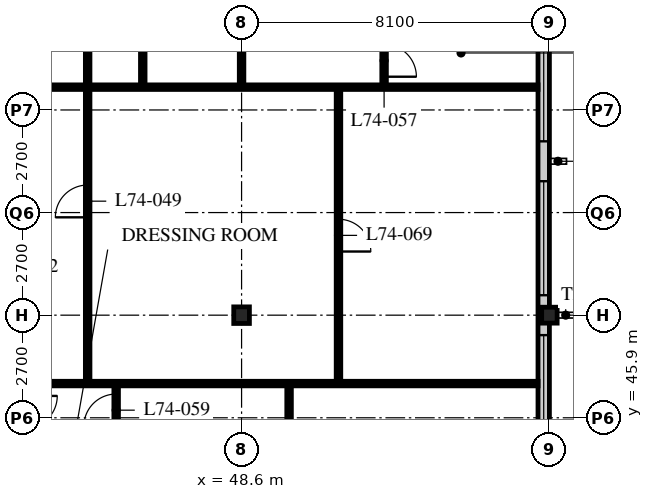
"""IFC4 building model, lengths in metres.
Left out: names, types, materials, properties, quantities, classifications, styles, units other than length and angle.
Written with IfcOpenShell. Run it as: python <this file> out.ifc"""

import sys

from ifc_helpers import new_model, si_unit, direction, frame, frame_2d, origin, origin_2d, place, context, subcontext, project, spatial, rectangle, i_section, extrude, element, fill, save


model = new_model("IFC4")
c1 = context("Model", 3, precision=1e-05, world=origin(), true_north=direction((0.0, 1.0)))
c2 = subcontext(c1, "Body", "Model", "MODEL_VIEW")
j1 = project(units=[si_unit("LENGTHUNIT", "METRE"), si_unit("PLANEANGLEUNIT", "RADIAN")], contexts=[c1])
p1 = place(None, origin())
s1 = spatial("IfcSite", under=j1, at=p1, CompositionType="ELEMENT")
p2 = place(p1, origin())
s2 = spatial("IfcBuilding", under=s1, at=p2, CompositionType="ELEMENT")
p3 = place(p2, frame((0.0, 0.0, 289.2)))
s3 = spatial("IfcBuildingStorey", under=s2, at=p3, CompositionType="ELEMENT", Elevation=289.2)
p4 = place(p3, frame((48.6, 48.6, 0.0), z_axis=(0.0, 0.0, 1.0), x_axis=(1.0, 0.0, 0.0)))
e1 = element("IfcColumn", 1, at=p4, inside=s3, PredefinedType="COLUMN", context=c2, shape_type="SweptSolid", body=[
    extrude(i_section(OverallWidth=0.412, OverallDepth=0.437, WebThickness=0.036, FlangeThickness=0.058, FilletRadius=0.015, at=origin_2d()), origin(), (0.0, 0.0, 1.0), 3.9),
])
p5 = place(p3, frame((56.7, 48.6, 0.0), z_axis=(0.0, 0.0, 1.0), x_axis=(1.0, 0.0, 0.0)))
e2 = element("IfcColumn", 2, at=p5, inside=s3, PredefinedType="COLUMN", context=c2, shape_type="SweptSolid", body=[
    extrude(i_section(OverallWidth=0.407, OverallDepth=0.419, WebThickness=0.031, FlangeThickness=0.049, FilletRadius=0.015, at=origin_2d()), origin(), (0.0, 0.0, 1.0), 3.9),
])
p6 = place(p3, frame((56.55, 24.6, 0.0), z_axis=(0.0, 0.0, 1.0), x_axis=(0.0, 1.0, 0.0)))
e3 = element("IfcWall", 3, at=p6, inside=s3, PredefinedType="SOLIDWALL", context=c2, shape_type="SweptSolid", body=[
    extrude(rectangle(XDim=32.1, YDim=0.3, at=frame_2d((16.05, 0.0))), origin(), (0.0, 0.0, 1.0), 3.69),
])
p7 = place(p6, frame((0.225, 0.0, 0.6)))
e4 = element("IfcOpeningElement", 4, at=p7, cuts=e3, PredefinedType="OPENING", context=c2, shape_type="SweptSolid", body=[
    extrude(rectangle(XDim=3.0, YDim=2.4, at=frame_2d((1.5, 1.2))), frame((0.0, 0.16, 0.0), z_axis=(0.0, -1.0, 0.0), x_axis=(1.0, 0.0, 0.0)), (0.0, 0.0, 1.0), 0.32),
])
p8 = place(p6, frame((4.275, 0.0, 0.6)))
e5 = element("IfcOpeningElement", 5, at=p8, cuts=e3, PredefinedType="OPENING", context=c2, shape_type="SweptSolid", body=[
    extrude(rectangle(XDim=3.0, YDim=2.4, at=frame_2d((1.5, 1.2))), frame((0.0, 0.16, 0.0), z_axis=(0.0, -1.0, 0.0), x_axis=(1.0, 0.0, 0.0)), (0.0, 0.0, 1.0), 0.32),
])
p9 = place(p6, frame((8.325, 0.0, 0.6)))
e6 = element("IfcOpeningElement", 6, at=p9, cuts=e3, PredefinedType="OPENING", context=c2, shape_type="SweptSolid", body=[
    extrude(rectangle(XDim=3.0, YDim=2.4, at=frame_2d((1.5, 1.2))), frame((0.0, 0.16, 0.0), z_axis=(0.0, -1.0, 0.0), x_axis=(1.0, 0.0, 0.0)), (0.0, 0.0, 1.0), 0.32),
])
p10 = place(p6, frame((12.375, 0.0, 0.6)))
e7 = element("IfcOpeningElement", 7, at=p10, cuts=e3, PredefinedType="OPENING", context=c2, shape_type="SweptSolid", body=[
    extrude(rectangle(XDim=3.0, YDim=2.4, at=frame_2d((1.5, 1.2))), frame((0.0, 0.16, 0.0), z_axis=(0.0, -1.0, 0.0), x_axis=(1.0, 0.0, 0.0)), (0.0, 0.0, 1.0), 0.32),
])
p11 = place(p6, frame((16.425, 0.0, 0.6)))
e8 = element("IfcOpeningElement", 8, at=p11, cuts=e3, PredefinedType="OPENING", context=c2, shape_type="SweptSolid", body=[
    extrude(rectangle(XDim=3.0, YDim=2.4, at=frame_2d((1.5, 1.2))), frame((0.0, 0.16, 0.0), z_axis=(0.0, -1.0, 0.0), x_axis=(1.0, 0.0, 0.0)), (0.0, 0.0, 1.0), 0.32),
])
p12 = place(p6, frame((20.475, 0.0, 0.6)))
e9 = element("IfcOpeningElement", 9, at=p12, cuts=e3, PredefinedType="OPENING", context=c2, shape_type="SweptSolid", body=[
    extrude(rectangle(XDim=3.0, YDim=2.4, at=frame_2d((1.5, 1.2))), frame((0.0, 0.16, 0.0), z_axis=(0.0, -1.0, 0.0), x_axis=(1.0, 0.0, 0.0)), (0.0, 0.0, 1.0), 0.32),
])
p13 = place(p6, frame((24.525, 0.0, 0.6)))
e10 = element("IfcOpeningElement", 10, at=p13, cuts=e3, PredefinedType="OPENING", context=c2, shape_type="SweptSolid", body=[
    extrude(rectangle(XDim=3.0, YDim=2.4, at=frame_2d((1.5, 1.2))), frame((0.0, 0.16, 0.0), z_axis=(0.0, -1.0, 0.0), x_axis=(1.0, 0.0, 0.0)), (0.0, 0.0, 1.0), 0.32),
])
p14 = place(p6, frame((28.575, 0.0, 0.6)))
e11 = element("IfcOpeningElement", 11, at=p14, cuts=e3, PredefinedType="OPENING", context=c2, shape_type="SweptSolid", body=[
    extrude(rectangle(XDim=3.0, YDim=2.4, at=frame_2d((1.5, 1.2))), frame((0.0, 0.16, 0.0), z_axis=(0.0, -1.0, 0.0), x_axis=(1.0, 0.0, 0.0)), (0.0, 0.0, 1.0), 0.32),
])
p15 = place(p3, frame((42.9, 46.8, 0.0), z_axis=(0.0, 0.0, 1.0), x_axis=(1.0, 0.0, 0.0)))
e12 = element("IfcWall", 12, at=p15, inside=s3, PredefinedType="PARTITIONING", context=c2, shape_type="SweptSolid", body=[
    extrude(rectangle(XDim=13.5, YDim=0.12, at=frame_2d((6.75, 0.0))), origin(), (0.0, 0.0, 1.0), 3.69),
])
p16 = place(p3, frame((36.45, 54.6, 0.0), z_axis=(0.0, 0.0, 1.0), x_axis=(1.0, 0.0, 0.0)))
e13 = element("IfcWall", 13, at=p16, inside=s3, PredefinedType="PARTITIONING", context=c2, shape_type="SweptSolid", body=[
    extrude(rectangle(XDim=19.95, YDim=0.12, at=frame_2d((9.975, 0.0))), origin(), (0.0, 0.0, 1.0), 3.69),
])
p17 = place(p16, frame((1.675, 0.0, 0.0)))
e14 = element("IfcOpeningElement", 14, at=p17, cuts=e13, PredefinedType="OPENING", context=c2, shape_type="SweptSolid", body=[
    extrude(rectangle(XDim=0.85, YDim=2.1, at=frame_2d((0.425, 1.05))), frame((0.0, 0.07, 0.0), z_axis=(0.0, -1.0, 0.0), x_axis=(1.0, 0.0, 0.0)), (0.0, 0.0, 1.0), 0.14),
])
p18 = place(p3, frame((44.55, 64.5, 0.0), z_axis=(0.0, 0.0, 1.0), x_axis=(0.0, -1.0, 0.0)))
e15 = element("IfcWall", 15, at=p18, inside=s3, PredefinedType="PARTITIONING", context=c2, shape_type="SweptSolid", body=[
    extrude(rectangle(XDim=17.7, YDim=0.12, at=frame_2d((8.85, 0.0))), origin(), (0.0, 0.0, 1.0), 3.69),
])
p19 = place(p18, frame((12.475, 0.0, 0.0)))
e16 = element("IfcOpeningElement", 16, at=p19, cuts=e15, PredefinedType="OPENING", context=c2, shape_type="SweptSolid", body=[
    extrude(rectangle(XDim=0.85, YDim=2.1, at=frame_2d((0.425, 1.05))), frame((0.0, 0.07, 0.0), z_axis=(0.0, -1.0, 0.0), x_axis=(1.0, 0.0, 0.0)), (0.0, 0.0, 1.0), 0.14),
])
p20 = place(p18, frame((4.525, 0.0, 0.0)))
e17 = element("IfcOpeningElement", 17, at=p20, cuts=e15, PredefinedType="OPENING", context=c2, shape_type="SweptSolid", body=[
    extrude(rectangle(XDim=0.85, YDim=2.1, at=frame_2d((0.425, 1.05))), frame((0.0, 0.07, 0.0), z_axis=(0.0, -1.0, 0.0), x_axis=(1.0, 0.0, 0.0)), (0.0, 0.0, 1.0), 0.14),
])
p21 = place(p3, frame((52.35, 54.6, 0.0), z_axis=(0.0, 0.0, 1.0), x_axis=(0.0, 1.0, 0.0)))
e18 = element("IfcWall", 18, at=p21, inside=s3, PredefinedType="PARTITIONING", context=c2, shape_type="SweptSolid", body=[
    extrude(rectangle(XDim=1.8, YDim=0.12, at=frame_2d((0.9, 0.0))), origin(), (0.0, 0.0, 1.0), 3.69),
])
p22 = place(p21, frame((0.275, 0.0, 0.0)))
e19 = element("IfcOpeningElement", 19, at=p22, cuts=e18, PredefinedType="OPENING", context=c2, shape_type="SweptSolid", body=[
    extrude(rectangle(XDim=0.85, YDim=2.1, at=frame_2d((0.425, 1.05))), frame((0.0, 0.07, 0.0), z_axis=(0.0, -1.0, 0.0), x_axis=(1.0, 0.0, 0.0)), (0.0, 0.0, 1.0), 0.14),
])
p23 = place(p3, frame((45.3, 46.8, 0.0), z_axis=(0.0, 0.0, 1.0), x_axis=(0.0, -1.0, 0.0)))
e20 = element("IfcWall", 20, at=p23, inside=s3, PredefinedType="PARTITIONING", context=c2, shape_type="SweptSolid", body=[
    extrude(rectangle(XDim=4.01, YDim=0.12, at=frame_2d((2.005, 0.0))), origin(), (0.0, 0.0, 1.0), 3.69),
])
p24 = place(p23, frame((0.275, 0.0, 0.0)))
e21 = element("IfcOpeningElement", 21, at=p24, cuts=e20, PredefinedType="OPENING", context=c2, shape_type="SweptSolid", body=[
    extrude(rectangle(XDim=0.85, YDim=2.1, at=frame_2d((0.425, 1.05))), frame((0.0, 0.07, 0.0), z_axis=(0.0, -1.0, 0.0), x_axis=(1.0, 0.0, 0.0)), (0.0, 0.0, 1.0), 0.14),
])
p25 = place(p3, frame((51.15, 46.8, 0.0), z_axis=(0.0, 0.0, 1.0), x_axis=(0.0, 1.0, 0.0)))
e22 = element("IfcWall", 22, at=p25, inside=s3, PredefinedType="PARTITIONING", context=c2, shape_type="SweptSolid", body=[
    extrude(rectangle(XDim=7.8, YDim=0.12, at=frame_2d((3.9, 0.0))), origin(), (0.0, 0.0, 1.0), 3.69),
])
p26 = place(p25, frame((3.475, 0.0, 0.0)))
e23 = element("IfcOpeningElement", 23, at=p26, cuts=e22, PredefinedType="OPENING", context=c2, shape_type="SweptSolid", body=[
    extrude(rectangle(XDim=0.85, YDim=2.1, at=frame_2d((0.425, 1.05))), frame((0.0, 0.07, 0.0), z_axis=(0.0, -1.0, 0.0), x_axis=(1.0, 0.0, 0.0)), (0.0, 0.0, 1.0), 0.14),
])
p27 = place(p3, frame((46.0, 54.6, 0.0), z_axis=(0.0, 0.0, 1.0), x_axis=(0.0, 1.0, 0.0)))
e24 = element("IfcWall", 24, at=p27, inside=s3, PredefinedType="PARTITIONING", context=c2, shape_type="SweptSolid", body=[
    extrude(rectangle(XDim=5.85, YDim=0.12, at=frame_2d((2.925, 0.0))), origin(), (0.0, 0.0, 1.0), 3.69),
])
p28 = place(p27, frame((2.5, 0.0, 0.0)))
e25 = element("IfcOpeningElement", 25, at=p28, cuts=e24, PredefinedType="OPENING", context=c2, shape_type="SweptSolid", body=[
    extrude(rectangle(XDim=0.85, YDim=2.1, at=frame_2d((0.425, 1.05))), frame((0.0, 0.07, 0.0), z_axis=(0.0, -1.0, 0.0), x_axis=(1.0, 0.0, 0.0)), (0.0, 0.0, 1.0), 0.14),
])
p29 = place(p3, frame((49.85, 40.5, 0.0), z_axis=(0.0, 0.0, 1.0), x_axis=(0.0, 1.0, 0.0)))
e26 = element("IfcWall", 26, at=p29, inside=s3, PredefinedType="PARTITIONING", context=c2, shape_type="SweptSolid", body=[
    extrude(rectangle(XDim=6.3, YDim=0.12, at=frame_2d((3.15, 0.0))), origin(), (0.0, 0.0, 1.0), 3.69),
])
p30 = place(p29, frame((2.725, 0.0, 0.0)))
e27 = element("IfcOpeningElement", 27, at=p30, cuts=e26, PredefinedType="OPENING", context=c2, shape_type="SweptSolid", body=[
    extrude(rectangle(XDim=0.85, YDim=2.1, at=frame_2d((0.425, 1.05))), frame((0.0, 0.07, 0.0), z_axis=(0.0, -1.0, 0.0), x_axis=(1.0, 0.0, 0.0)), (0.0, 0.0, 1.0), 0.14),
])
p31 = place(p3, frame((48.6, 54.6, 0.0), z_axis=(0.0, 0.0, 1.0), x_axis=(0.0, 1.0, 0.0)))
e28 = element("IfcWall", 28, at=p31, inside=s3, PredefinedType="PARTITIONING", context=c2, shape_type="SweptSolid", body=[
    extrude(rectangle(XDim=1.897, YDim=0.12, at=frame_2d((0.948, 0.0))), origin(), (0.0, 0.0, 1.0), 3.078),
])
p32 = place(p12, origin())
e29 = element("IfcWindow", 29, at=p32, inside=s3, PartitioningType="SINGLE_PANEL", PredefinedType="WINDOW", context=c2, shape_type="SweptSolid", body=[
    extrude(rectangle(XDim=3.0, YDim=2.4, at=frame_2d((1.5, 1.2))), frame((0.0, 0.03, 0.0), z_axis=(0.0, -1.0, 0.0), x_axis=(1.0, 0.0, 0.0)), (0.0, 0.0, 1.0), 0.06),
])
fill(e9, e29)
p33 = place(p13, origin())
e30 = element("IfcWindow", 30, at=p33, inside=s3, PartitioningType="SINGLE_PANEL", PredefinedType="WINDOW", context=c2, shape_type="SweptSolid", body=[
    extrude(rectangle(XDim=3.0, YDim=2.4, at=frame_2d((1.5, 1.2))), frame((0.0, 0.03, 0.0), z_axis=(0.0, -1.0, 0.0), x_axis=(1.0, 0.0, 0.0)), (0.0, 0.0, 1.0), 0.06),
])
fill(e10, e30)
p34 = place(p14, origin())
e31 = element("IfcWindow", 31, at=p34, inside=s3, PartitioningType="SINGLE_PANEL", PredefinedType="WINDOW", context=c2, shape_type="SweptSolid", body=[
    extrude(rectangle(XDim=3.0, YDim=2.4, at=frame_2d((1.5, 1.2))), frame((0.0, 0.03, 0.0), z_axis=(0.0, -1.0, 0.0), x_axis=(1.0, 0.0, 0.0)), (0.0, 0.0, 1.0), 0.06),
])
fill(e11, e31)
p35 = place(p19, origin())
e32 = element("IfcDoor", 32, at=p35, inside=s3, OperationType="SINGLE_SWING_LEFT", PredefinedType="DOOR", context=c2, shape_type="SweptSolid", body=[
    extrude(rectangle(XDim=0.85, YDim=2.1, at=frame_2d((0.425, 1.05))), frame((0.0, 0.025, 0.0), z_axis=(0.0, -1.0, 0.0), x_axis=(1.0, 0.0, 0.0)), (0.0, 0.0, 1.0), 0.05),
])
fill(e16, e32)
p36 = place(p22, origin())
e33 = element("IfcDoor", 33, at=p36, inside=s3, OperationType="SINGLE_SWING_RIGHT", PredefinedType="DOOR", context=c2, shape_type="SweptSolid", body=[
    extrude(rectangle(XDim=0.85, YDim=2.1, at=frame_2d((0.425, 1.05))), frame((0.0, 0.025, 0.0), z_axis=(0.0, -1.0, 0.0), x_axis=(1.0, 0.0, 0.0)), (0.0, 0.0, 1.0), 0.05),
])
fill(e19, e33)
p37 = place(p24, origin())
e34 = element("IfcDoor", 34, at=p37, inside=s3, OperationType="SINGLE_SWING_LEFT", PredefinedType="DOOR", context=c2, shape_type="SweptSolid", body=[
    extrude(rectangle(XDim=0.85, YDim=2.1, at=frame_2d((0.425, 1.05))), frame((0.0, 0.025, 0.0), z_axis=(0.0, -1.0, 0.0), x_axis=(1.0, 0.0, 0.0)), (0.0, 0.0, 1.0), 0.05),
])
fill(e21, e34)
p38 = place(p26, origin())
e35 = element("IfcDoor", 35, at=p38, inside=s3, OperationType="SINGLE_SWING_RIGHT", PredefinedType="DOOR", context=c2, shape_type="SweptSolid", body=[
    extrude(rectangle(XDim=0.85, YDim=2.1, at=frame_2d((0.425, 1.05))), frame((0.0, 0.025, 0.0), z_axis=(0.0, -1.0, 0.0), x_axis=(1.0, 0.0, 0.0)), (0.0, 0.0, 1.0), 0.05),
])
fill(e23, e35)
save(model, sys.argv[1])
